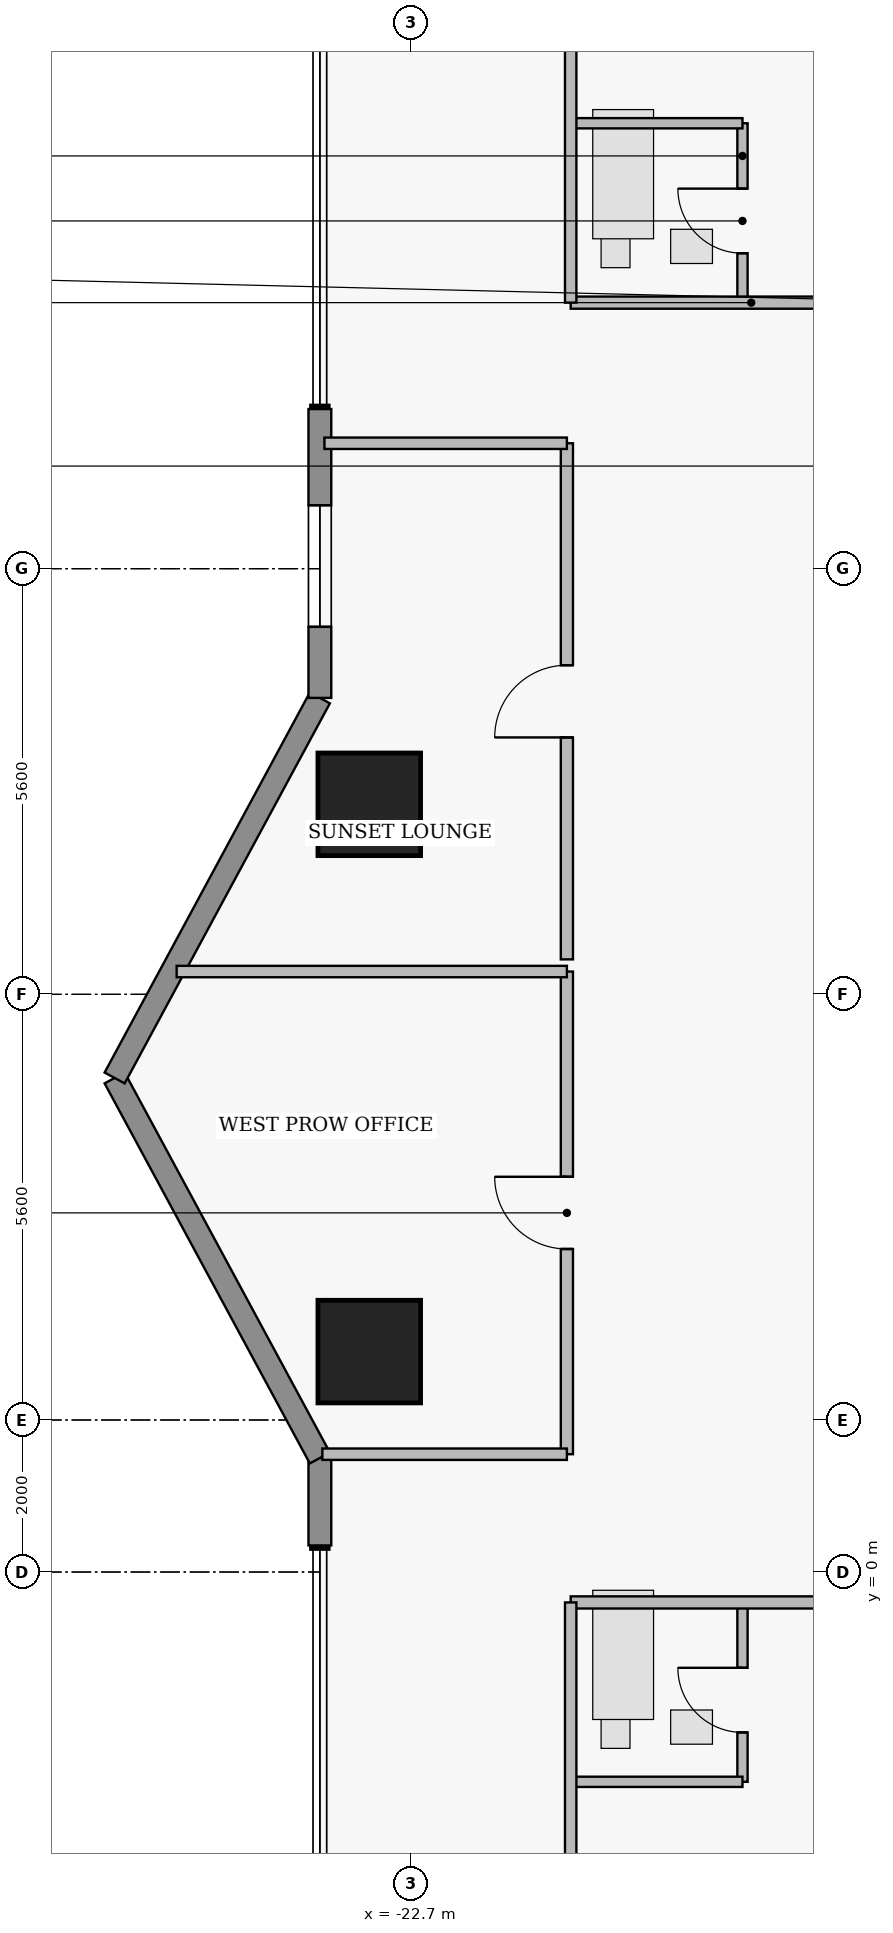
"""IFC4 building model, lengths in metres.
Left out: names, types, materials, properties, quantities, classifications, styles, units other than length and angle.
Written with IfcOpenShell. Run it as: python <this file> out.ifc"""

import sys

from ifc_helpers import new_model, si_unit, direction, frame, frame_2d, origin, origin_2d, place, context, subcontext, project, spatial, rectangle, extrude, element, fill, save


model = new_model("IFC4")
c1 = context("Model", 3, precision=1e-05, world=origin(), true_north=direction((0.0, 1.0)))
c2 = subcontext(c1, "Body", "Model", "MODEL_VIEW")
j1 = project(units=[si_unit("LENGTHUNIT", "METRE"), si_unit("PLANEANGLEUNIT", "RADIAN")], contexts=[c1])
p1 = place(None, origin())
s1 = spatial("IfcSite", under=j1, at=p1, CompositionType="ELEMENT")
p2 = place(p1, origin())
s2 = spatial("IfcBuilding", under=s1, at=p2, CompositionType="ELEMENT")
p3 = place(p2, frame((0.0, 0.0, 95.65)))
s3 = spatial("IfcBuildingStorey", under=s2, at=p3, CompositionType="ELEMENT", Elevation=95.65)
for number, where, z_axis, x_axis in (
    (1, (-23.25, 2.9, 0.43), (0.0, 0.0, 1.0), (1.0, 0.0, 0.0)),
    (2, (-23.25, 10.1, 0.43), (0.0, 0.0, 1.0), (1.0, 0.0, 0.0)),
):
    element("IfcColumn", number, at=place(p3, frame(where, z_axis=z_axis, x_axis=x_axis)), inside=s3, PredefinedType="COLUMN", context=c2, shape_type="SweptSolid", body=[
        extrude(rectangle(XDim=1.35, YDim=1.35, at=origin_2d()), origin(), (0.0, 0.0, 1.0), 3.22),
    ])
p4 = place(p3, frame((-23.9, 0.35, 0.0), z_axis=(0.0, 0.0, 1.0), x_axis=(0.0, 1.0, 0.0)))
e3 = element("IfcWall", 3, at=p4, inside=s3, PredefinedType="STANDARD", context=c2, shape_type="SweptSolid", body=[
    extrude(rectangle(XDim=1.15, YDim=0.3, at=frame_2d((0.575, 0.0))), origin(), (0.0, 0.0, 1.0), 3.43),
])
for number, where, z_axis, x_axis in (
    (4, (-23.9, 1.5, 0.0), (0.0, 0.0, 1.0), (-0.475, 0.88, 0.0)),
    (5, (-26.6, 6.5, 0.0), (0.0, 0.0, 1.0), (0.475, 0.88, 0.0)),
):
    element("IfcWall", number, at=place(p3, frame(where, z_axis=z_axis, x_axis=x_axis)), inside=s3, PredefinedType="STANDARD", context=c2, shape_type="SweptSolid", body=[
        extrude(rectangle(XDim=5.683, YDim=0.3, at=frame_2d((2.841, 0.0))), origin(), (0.0, 0.0, 1.0), 3.43),
    ])
p5 = place(p3, frame((-23.9, 11.5, 0.0), z_axis=(0.0, 0.0, 1.0), x_axis=(0.0, 1.0, 0.0)))
e6 = element("IfcWall", 6, at=p5, inside=s3, PredefinedType="STANDARD", context=c2, shape_type="SweptSolid", body=[
    extrude(rectangle(XDim=3.8, YDim=0.3, at=frame_2d((1.9, 0.0))), origin(), (0.0, 0.0, 1.0), 3.43),
])
p6 = place(p5, frame((0.935, 0.0, 0.85)))
e7 = element("IfcOpeningElement", 7, at=p6, cuts=e6, PredefinedType="OPENING", context=c2, shape_type="SweptSolid", body=[
    extrude(rectangle(XDim=1.6, YDim=1.8, at=frame_2d((0.8, 0.9))), frame((0.0, 0.16, 0.0), z_axis=(0.0, -1.0, 0.0), x_axis=(1.0, 0.0, 0.0)), (0.0, 0.0, 1.0), 0.32),
])
p7 = place(p3, frame((-18.34, 16.7, 0.0), z_axis=(0.0, 0.0, 1.0), x_axis=(0.0, 1.0, 0.0)))
e8 = element("IfcWall", 8, at=p7, inside=s3, PredefinedType="PLUMBINGWALL", context=c2, shape_type="SweptSolid", body=[
    extrude(rectangle(XDim=2.36, YDim=0.135, at=frame_2d((1.18, 0.0))), origin(), (0.0, 0.0, 1.0), 3.43),
])
p8 = place(p7, frame((0.65, 0.0, 0.0)))
e9 = element("IfcOpeningElement", 9, at=p8, cuts=e8, PredefinedType="OPENING", context=c2, shape_type="SweptSolid", body=[
    extrude(rectangle(XDim=0.85, YDim=2.1, at=frame_2d((0.425, 1.05))), frame((0.0, 0.077, 0.0), z_axis=(0.0, -1.0, 0.0), x_axis=(1.0, 0.0, 0.0)), (0.0, 0.0, 1.0), 0.155),
])
p9 = place(p3, frame((-20.6, 16.7, 0.0), z_axis=(0.0, 0.0, 1.0), x_axis=(1.0, 0.0, 0.0)))
e10 = element("IfcWall", 10, at=p9, inside=s3, PredefinedType="PARTITIONING", context=c2, shape_type="SweptSolid", body=[
    extrude(rectangle(XDim=8.2, YDim=0.16, at=frame_2d((4.1, 0.0))), origin(), (0.0, 0.0, 1.0), 2.973),
])
p10 = place(p9, frame((4.75, 0.0, 0.0)))
e11 = element("IfcOpeningElement", 11, at=p10, cuts=e10, PredefinedType="OPENING", context=c2, shape_type="SweptSolid", body=[
    extrude(rectangle(XDim=1.0, YDim=2.15, at=frame_2d((0.5, 1.075))), frame((0.0, 0.09, 0.0), z_axis=(0.0, -1.0, 0.0), x_axis=(1.0, 0.0, 0.0)), (0.0, 0.0, 1.0), 0.18),
])
p11 = place(p3, frame((-18.34, -2.76, 0.0), z_axis=(0.0, 0.0, 1.0), x_axis=(0.0, 1.0, 0.0)))
e12 = element("IfcWall", 12, at=p11, inside=s3, PredefinedType="PLUMBINGWALL", context=c2, shape_type="SweptSolid", body=[
    extrude(rectangle(XDim=2.36, YDim=0.135, at=frame_2d((1.18, 0.0))), origin(), (0.0, 0.0, 1.0), 3.43),
])
p12 = place(p11, frame((0.65, 0.0, 0.0)))
e13 = element("IfcOpeningElement", 13, at=p12, cuts=e12, PredefinedType="OPENING", context=c2, shape_type="SweptSolid", body=[
    extrude(rectangle(XDim=0.85, YDim=2.1, at=frame_2d((0.425, 1.05))), frame((0.0, 0.077, 0.0), z_axis=(0.0, -1.0, 0.0), x_axis=(1.0, 0.0, 0.0)), (0.0, 0.0, 1.0), 0.155),
])
p13 = place(p3, frame((-20.6, -0.4, 0.0), z_axis=(0.0, 0.0, 1.0), x_axis=(1.0, 0.0, 0.0)))
e14 = element("IfcWall", 14, at=p13, inside=s3, PredefinedType="PARTITIONING", context=c2, shape_type="SweptSolid", body=[
    extrude(rectangle(XDim=9.4, YDim=0.16, at=frame_2d((4.7, 0.0))), origin(), (0.0, 0.0, 1.0), 3.43),
])
p14 = place(p13, frame((5.35, 0.0, 0.0)))
e15 = element("IfcOpeningElement", 15, at=p14, cuts=e14, PredefinedType="OPENING", context=c2, shape_type="SweptSolid", body=[
    extrude(rectangle(XDim=1.0, YDim=2.15, at=frame_2d((0.5, 1.075))), frame((0.0, 0.09, 0.0), z_axis=(0.0, -1.0, 0.0), x_axis=(1.0, 0.0, 0.0)), (0.0, 0.0, 1.0), 0.18),
])
p15 = place(p3, frame((-20.65, 1.55, 0.0), z_axis=(0.0, 0.0, 1.0), x_axis=(0.0, 1.0, 0.0)))
e16 = element("IfcWall", 16, at=p15, inside=s3, PredefinedType="PARTITIONING", context=c2, shape_type="SweptSolid", body=[
    extrude(rectangle(XDim=6.35, YDim=0.16, at=frame_2d((3.175, 0.0))), origin(), (0.0, 0.0, 1.0), 3.43),
])
p16 = place(p15, frame((2.7, 0.0, 0.0)))
e17 = element("IfcOpeningElement", 17, at=p16, cuts=e16, PredefinedType="OPENING", context=c2, shape_type="SweptSolid", body=[
    extrude(rectangle(XDim=0.95, YDim=2.15, at=frame_2d((0.475, 1.075))), frame((0.0, 0.09, 0.0), z_axis=(0.0, -1.0, 0.0), x_axis=(1.0, 0.0, 0.0)), (0.0, 0.0, 1.0), 0.18),
])
p17 = place(p3, frame((-20.65, 8.06, 0.0), z_axis=(0.0, 0.0, 1.0), x_axis=(0.0, 1.0, 0.0)))
e18 = element("IfcWall", 18, at=p17, inside=s3, PredefinedType="PARTITIONING", context=c2, shape_type="SweptSolid", body=[
    extrude(rectangle(XDim=6.79, YDim=0.16, at=frame_2d((3.395, 0.0))), origin(), (0.0, 0.0, 1.0), 3.43),
])
p18 = place(p17, frame((2.92, 0.0, 0.0)))
e19 = element("IfcOpeningElement", 19, at=p18, cuts=e18, PredefinedType="OPENING", context=c2, shape_type="SweptSolid", body=[
    extrude(rectangle(XDim=0.95, YDim=2.15, at=frame_2d((0.475, 1.075))), frame((0.0, 0.09, 0.0), z_axis=(0.0, -1.0, 0.0), x_axis=(1.0, 0.0, 0.0)), (0.0, 0.0, 1.0), 0.18),
])
p19 = place(p3, frame((-20.6, 19.06, 0.0), z_axis=(0.0, 0.0, 1.0), x_axis=(1.0, 0.0, 0.0)))
e20 = element("IfcWall", 20, at=p19, inside=s3, PredefinedType="PLUMBINGWALL", context=c2, shape_type="SweptSolid", body=[
    extrude(rectangle(XDim=2.26, YDim=0.135, at=frame_2d((1.13, 0.0))), origin(), (0.0, 0.0, 1.0), 3.43),
])
p20 = place(p3, frame((-20.6, 16.7, 0.0), z_axis=(0.0, 0.0, 1.0), x_axis=(0.0, 1.0, 0.0)))
e21 = element("IfcWall", 21, at=p20, inside=s3, PredefinedType="PARTITIONING", context=c2, shape_type="SweptSolid", body=[
    extrude(rectangle(XDim=8.2, YDim=0.15, at=frame_2d((4.1, 0.0))), origin(), (0.0, 0.0, 1.0), 3.43),
])
p21 = place(p3, frame((-20.6, -2.76, 0.0), z_axis=(0.0, 0.0, 1.0), x_axis=(1.0, 0.0, 0.0)))
e22 = element("IfcWall", 22, at=p21, inside=s3, PredefinedType="PLUMBINGWALL", context=c2, shape_type="SweptSolid", body=[
    extrude(rectangle(XDim=2.26, YDim=0.135, at=frame_2d((1.13, 0.0))), origin(), (0.0, 0.0, 1.0), 3.43),
])
p22 = place(p3, frame((-20.6, -11.9, 0.0), z_axis=(0.0, 0.0, 1.0), x_axis=(0.0, 1.0, 0.0)))
e23 = element("IfcWall", 23, at=p22, inside=s3, PredefinedType="PARTITIONING", context=c2, shape_type="SweptSolid", body=[
    extrude(rectangle(XDim=11.5, YDim=0.15, at=frame_2d((5.75, 0.0))), origin(), (0.0, 0.0, 1.0), 3.43),
])
p23 = place(p3, frame((-23.867, 1.55, 0.0), z_axis=(0.0, 0.0, 1.0), x_axis=(1.0, 0.0, 0.0)))
e24 = element("IfcWall", 24, at=p23, inside=s3, PredefinedType="PARTITIONING", context=c2, shape_type="SweptSolid", body=[
    extrude(rectangle(XDim=3.217, YDim=0.15, at=frame_2d((1.608, 0.0))), origin(), (0.0, 0.0, 1.0), 3.43),
])
p24 = place(p3, frame((-25.784, 7.9, 0.0), z_axis=(0.0, 0.0, 1.0), x_axis=(1.0, 0.0, 0.0)))
e25 = element("IfcWall", 25, at=p24, inside=s3, PredefinedType="PARTITIONING", context=c2, shape_type="SweptSolid", body=[
    extrude(rectangle(XDim=5.134, YDim=0.15, at=frame_2d((2.567, 0.0))), origin(), (0.0, 0.0, 1.0), 3.43),
])
p25 = place(p3, frame((-23.84, 14.85, 0.0), z_axis=(0.0, 0.0, 1.0), x_axis=(1.0, 0.0, 0.0)))
e26 = element("IfcWall", 26, at=p25, inside=s3, PredefinedType="PARTITIONING", context=c2, shape_type="SweptSolid", body=[
    extrude(rectangle(XDim=3.19, YDim=0.15, at=frame_2d((1.595, 0.0))), origin(), (0.0, 0.0, 1.0), 3.43),
])
p26 = place(p6, origin())
e27 = element("IfcWindow", 27, at=p26, inside=s3, PartitioningType="SINGLE_PANEL", PredefinedType="WINDOW", context=c2, shape_type="SweptSolid", body=[
    extrude(rectangle(XDim=1.6, YDim=1.8, at=frame_2d((0.8, 0.9))), frame((0.0, 0.03, 0.0), z_axis=(0.0, -1.0, 0.0), x_axis=(1.0, 0.0, 0.0)), (0.0, 0.0, 1.0), 0.06),
])
fill(e7, e27)
p27 = place(p8, origin())
e28 = element("IfcDoor", 28, at=p27, inside=s3, OperationType="SINGLE_SWING_RIGHT", PredefinedType="DOOR", context=c2, shape_type="SweptSolid", body=[
    extrude(rectangle(XDim=0.85, YDim=2.1, at=frame_2d((0.425, 1.05))), frame((0.0, 0.025, 0.0), z_axis=(0.0, -1.0, 0.0), x_axis=(1.0, 0.0, 0.0)), (0.0, 0.0, 1.0), 0.05),
])
fill(e9, e28)
p28 = place(p12, origin())
e29 = element("IfcDoor", 29, at=p28, inside=s3, OperationType="SINGLE_SWING_RIGHT", PredefinedType="DOOR", context=c2, shape_type="SweptSolid", body=[
    extrude(rectangle(XDim=0.85, YDim=2.1, at=frame_2d((0.425, 1.05))), frame((0.0, 0.025, 0.0), z_axis=(0.0, -1.0, 0.0), x_axis=(1.0, 0.0, 0.0)), (0.0, 0.0, 1.0), 0.05),
])
fill(e13, e29)
p29 = place(p16, origin())
e30 = element("IfcDoor", 30, at=p29, inside=s3, OperationType="SINGLE_SWING_RIGHT", PredefinedType="DOOR", context=c2, shape_type="SweptSolid", body=[
    extrude(rectangle(XDim=0.95, YDim=2.15, at=frame_2d((0.475, 1.075))), frame((0.0, 0.025, 0.0), z_axis=(0.0, -1.0, 0.0), x_axis=(1.0, 0.0, 0.0)), (0.0, 0.0, 1.0), 0.05),
])
fill(e17, e30)
p30 = place(p18, origin())
e31 = element("IfcDoor", 31, at=p30, inside=s3, OperationType="SINGLE_SWING_LEFT", PredefinedType="DOOR", context=c2, shape_type="SweptSolid", body=[
    extrude(rectangle(XDim=0.95, YDim=2.15, at=frame_2d((0.475, 1.075))), frame((0.0, 0.025, 0.0), z_axis=(0.0, -1.0, 0.0), x_axis=(1.0, 0.0, 0.0)), (0.0, 0.0, 1.0), 0.05),
])
fill(e19, e31)
save(model, sys.argv[1])
